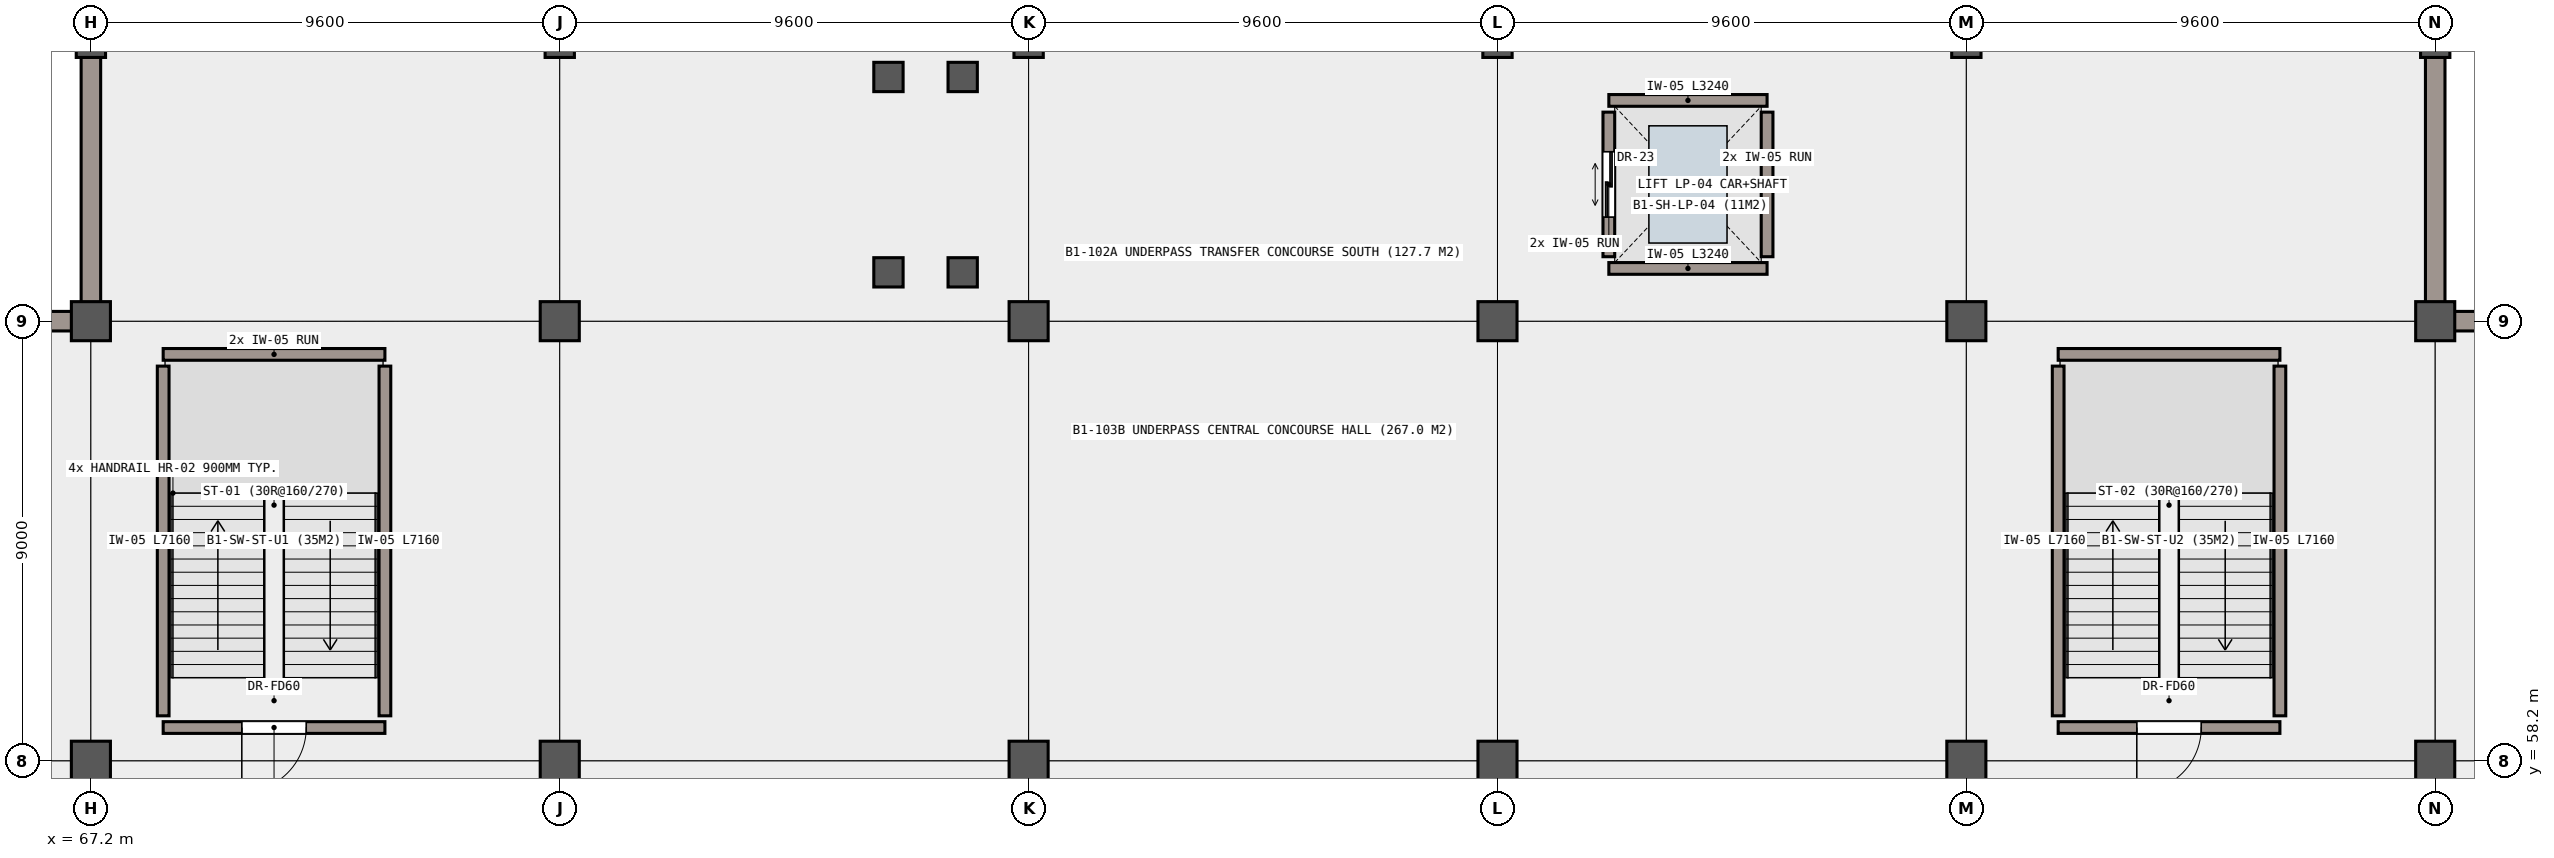
"""IFC4 building model, lengths in metres.
Left out: names, types, materials, properties, quantities, classifications, styles, units other than length and angle.
Written with IfcOpenShell. Run it as: python <this file> out.ifc"""

import sys

from ifc_helpers import new_model, si_unit, direction, frame, frame_2d, origin, origin_2d, place, context, subcontext, project, spatial, rectangle, extrude, element, fill, save


model = new_model("IFC4")
c1 = context("Model", 3, precision=1e-05, world=origin(), true_north=direction((0.0, 1.0)))
c2 = subcontext(c1, "Body", "Model", "MODEL_VIEW")
j1 = project(units=[si_unit("LENGTHUNIT", "METRE"), si_unit("PLANEANGLEUNIT", "RADIAN")], contexts=[c1])
p1 = place(None, origin())
s1 = spatial("IfcSite", under=j1, at=p1, CompositionType="ELEMENT")
p2 = place(p1, origin())
s2 = spatial("IfcBuilding", under=s1, at=p2, CompositionType="ELEMENT")
p3 = place(p2, frame((0.0, 0.0, -4.8)))
s3 = spatial("IfcBuildingStorey", under=s2, at=p3, CompositionType="ELEMENT", Elevation=-4.8)
for number, where, z_axis, x_axis in (
    (1, (67.2, 58.2, 0.0), (0.0, 0.0, 1.0), (1.0, 0.0, 0.0)),
    (2, (67.2, 67.2, 0.0), (0.0, 0.0, 1.0), (1.0, 0.0, 0.0)),
    (3, (76.8, 58.2, 0.0), (0.0, 0.0, 1.0), (1.0, 0.0, 0.0)),
    (4, (76.8, 67.2, 0.0), (0.0, 0.0, 1.0), (1.0, 0.0, 0.0)),
    (5, (86.4, 58.2, 0.0), (0.0, 0.0, 1.0), (1.0, 0.0, 0.0)),
    (6, (86.4, 67.2, 0.0), (0.0, 0.0, 1.0), (1.0, 0.0, 0.0)),
    (7, (96.0, 58.2, 0.0), (0.0, 0.0, 1.0), (1.0, 0.0, 0.0)),
    (8, (96.0, 67.2, 0.0), (0.0, 0.0, 1.0), (1.0, 0.0, 0.0)),
    (9, (105.6, 58.2, 0.0), (0.0, 0.0, 1.0), (1.0, 0.0, 0.0)),
    (10, (105.6, 67.2, 0.0), (0.0, 0.0, 1.0), (1.0, 0.0, 0.0)),
    (11, (115.2, 58.2, 0.0), (0.0, 0.0, 1.0), (1.0, 0.0, 0.0)),
    (12, (115.2, 67.2, 0.0), (0.0, 0.0, 1.0), (1.0, 0.0, 0.0)),
):
    element("IfcColumn", number, at=place(p3, frame(where, z_axis=z_axis, x_axis=x_axis)), inside=s3, PredefinedType="COLUMN", context=c2, shape_type="SweptSolid", body=[
        extrude(rectangle(XDim=0.8, YDim=0.8, at=origin_2d()), origin(), (0.0, 0.0, 1.0), 4.8),
    ])
for number, where, z_axis, x_axis in (
    (13, (67.2, 72.9, 0.0), (0.0, 0.0, 1.0), (1.0, 0.0, 0.0)),
    (14, (76.8, 72.9, 0.0), (0.0, 0.0, 1.0), (1.0, 0.0, 0.0)),
    (15, (86.4, 72.9, 0.0), (0.0, 0.0, 1.0), (1.0, 0.0, 0.0)),
    (16, (96.0, 72.9, 0.0), (0.0, 0.0, 1.0), (1.0, 0.0, 0.0)),
    (17, (105.6, 72.9, 0.0), (0.0, 0.0, 1.0), (1.0, 0.0, 0.0)),
    (18, (115.2, 72.9, 0.0), (0.0, 0.0, 1.0), (1.0, 0.0, 0.0)),
):
    element("IfcColumn", number, at=place(p3, frame(where, z_axis=z_axis, x_axis=x_axis)), inside=s3, PredefinedType="COLUMN", context=c2, shape_type="SweptSolid", body=[
        extrude(rectangle(XDim=0.6, YDim=0.6, at=origin_2d()), origin(), (0.0, 0.0, 1.0), 4.5),
    ])
for number, where, z_axis, x_axis in (
    (19, (83.53, 68.2, 0.0), (0.0, 0.0, 1.0), (1.0, 0.0, 0.0)),
    (20, (83.53, 72.2, 0.0), (0.0, 0.0, 1.0), (1.0, 0.0, 0.0)),
    (21, (85.05, 68.2, 0.0), (0.0, 0.0, 1.0), (1.0, 0.0, 0.0)),
    (22, (85.05, 72.2, 0.0), (0.0, 0.0, 1.0), (1.0, 0.0, 0.0)),
):
    element("IfcColumn", number, at=place(p3, frame(where, z_axis=z_axis, x_axis=x_axis)), inside=s3, PredefinedType="COLUMN", context=c2, shape_type="SweptSolid", body=[
        extrude(rectangle(XDim=0.6, YDim=0.6, at=origin_2d()), origin(), (0.0, 0.0, 1.0), 4.8),
    ])
p4 = place(p3, frame((0.0, 67.2, 0.0), z_axis=(0.0, 0.0, 1.0), x_axis=(1.0, 0.0, 0.0)))
e23 = element("IfcWall", 23, at=p4, inside=s3, PredefinedType="USERDEFINED", context=c2, shape_type="SweptSolid", body=[
    extrude(rectangle(XDim=67.2, YDim=0.4, at=frame_2d((33.6, 0.0))), origin(), (0.0, 0.0, 1.0), 3.88),
])
for number, where, z_axis, x_axis in (
    (24, (67.2, 67.2, 0.0), (0.0, 0.0, 1.0), (0.0, 1.0, 0.0)),
    (25, (115.2, 124.8, 0.0), (0.0, 0.0, 1.0), (0.0, -1.0, 0.0)),
):
    element("IfcWall", number, at=place(p3, frame(where, z_axis=z_axis, x_axis=x_axis)), inside=s3, PredefinedType="USERDEFINED", context=c2, shape_type="SweptSolid", body=[
        extrude(rectangle(XDim=57.6, YDim=0.4, at=frame_2d((28.8, 0.0))), origin(), (0.0, 0.0, 1.0), 3.88),
    ])
p5 = place(p3, frame((115.2, 67.2, 0.0), z_axis=(0.0, 0.0, 1.0), x_axis=(1.0, 0.0, 0.0)))
e26 = element("IfcWall", 26, at=p5, inside=s3, PredefinedType="USERDEFINED", context=c2, shape_type="SweptSolid", body=[
    extrude(rectangle(XDim=9.6, YDim=0.4, at=frame_2d((4.8, 0.0))), origin(), (0.0, 0.0, 1.0), 3.88),
])
for number, where, z_axis, x_axis in (
    (27, (101.52, 68.28, 0.0), (0.0, 0.0, 1.0), (-1.0, 0.0, 0.0)),
    (28, (98.28, 71.72, 0.0), (0.0, 0.0, 1.0), (1.0, 0.0, 0.0)),
):
    element("IfcWall", number, at=place(p3, frame(where, z_axis=z_axis, x_axis=x_axis)), inside=s3, PredefinedType="SHEAR", context=c2, shape_type="SweptSolid", body=[
        extrude(rectangle(XDim=3.24, YDim=0.24, at=frame_2d((1.62, 0.0))), origin(), (0.0, 0.0, 1.0), 4.48),
    ])
p6 = place(p3, frame((98.28, 68.52, 0.0), z_axis=(0.0, 0.0, 1.0), x_axis=(0.0, 1.0, 0.0)))
e29 = element("IfcWall", 29, at=p6, inside=s3, PredefinedType="SHEAR", context=c2, shape_type="SweptSolid", body=[
    extrude(rectangle(XDim=2.96, YDim=0.24, at=frame_2d((1.48, 0.0))), origin(), (0.0, 0.0, 1.0), 4.48),
])
p7 = place(p6, frame((0.81, 0.0, 0.0)))
e30 = element("IfcOpeningElement", 30, at=p7, cuts=e29, PredefinedType="OPENING", context=c2, shape_type="SweptSolid", body=[
    extrude(rectangle(XDim=1.34, YDim=2.18, at=frame_2d((0.67, 1.09))), frame((0.0, 0.13, 0.0), z_axis=(0.0, -1.0, 0.0), x_axis=(1.0, 0.0, 0.0)), (0.0, 0.0, 1.0), 0.26),
])
p8 = place(p3, frame((101.52, 71.48, 0.0), z_axis=(0.0, 0.0, 1.0), x_axis=(0.0, -1.0, 0.0)))
e31 = element("IfcWall", 31, at=p8, inside=s3, PredefinedType="SHEAR", context=c2, shape_type="SweptSolid", body=[
    extrude(rectangle(XDim=2.96, YDim=0.24, at=frame_2d((1.48, 0.0))), origin(), (0.0, 0.0, 1.0), 4.48),
])
p9 = place(p3, frame((73.22, 58.88, 0.0), z_axis=(0.0, 0.0, 1.0), x_axis=(-1.0, 0.0, 0.0)))
e32 = element("IfcWall", 32, at=p9, inside=s3, PredefinedType="SHEAR", context=c2, shape_type="SweptSolid", body=[
    extrude(rectangle(XDim=4.54, YDim=0.24, at=frame_2d((2.27, 0.0))), origin(), (0.0, 0.0, 1.0), 4.48),
])
p10 = place(p9, frame((1.61, 0.0, 0.0)))
e33 = element("IfcOpeningElement", 33, at=p10, cuts=e32, PredefinedType="OPENING", context=c2, shape_type="SweptSolid", body=[
    extrude(rectangle(XDim=1.32, YDim=2.15, at=frame_2d((0.66, 1.075))), frame((0.0, 0.13, 0.0), z_axis=(0.0, -1.0, 0.0), x_axis=(1.0, 0.0, 0.0)), (0.0, 0.0, 1.0), 0.26),
])
p11 = place(p3, frame((68.68, 66.52, 0.0), z_axis=(0.0, 0.0, 1.0), x_axis=(1.0, 0.0, 0.0)))
e34 = element("IfcWall", 34, at=p11, inside=s3, PredefinedType="SHEAR", context=c2, shape_type="SweptSolid", body=[
    extrude(rectangle(XDim=4.54, YDim=0.24, at=frame_2d((2.27, 0.0))), origin(), (0.0, 0.0, 1.0), 4.48),
])
for number, where, z_axis, x_axis in (
    (35, (68.68, 59.12, 0.0), (0.0, 0.0, 1.0), (0.0, 1.0, 0.0)),
    (36, (73.22, 66.28, 0.0), (0.0, 0.0, 1.0), (0.0, -1.0, 0.0)),
):
    element("IfcWall", number, at=place(p3, frame(where, z_axis=z_axis, x_axis=x_axis)), inside=s3, PredefinedType="SHEAR", context=c2, shape_type="SweptSolid", body=[
        extrude(rectangle(XDim=7.16, YDim=0.24, at=frame_2d((3.58, 0.0))), origin(), (0.0, 0.0, 1.0), 4.48),
    ])
p12 = place(p3, frame((112.02, 58.88, 0.0), z_axis=(0.0, 0.0, 1.0), x_axis=(-1.0, 0.0, 0.0)))
e37 = element("IfcWall", 37, at=p12, inside=s3, PredefinedType="SHEAR", context=c2, shape_type="SweptSolid", body=[
    extrude(rectangle(XDim=4.54, YDim=0.24, at=frame_2d((2.27, 0.0))), origin(), (0.0, 0.0, 1.0), 4.48),
])
p13 = place(p12, frame((1.61, 0.0, 0.0)))
e38 = element("IfcOpeningElement", 38, at=p13, cuts=e37, PredefinedType="OPENING", context=c2, shape_type="SweptSolid", body=[
    extrude(rectangle(XDim=1.32, YDim=2.15, at=frame_2d((0.66, 1.075))), frame((0.0, 0.13, 0.0), z_axis=(0.0, -1.0, 0.0), x_axis=(1.0, 0.0, 0.0)), (0.0, 0.0, 1.0), 0.26),
])
p14 = place(p3, frame((107.48, 66.52, 0.0), z_axis=(0.0, 0.0, 1.0), x_axis=(1.0, 0.0, 0.0)))
e39 = element("IfcWall", 39, at=p14, inside=s3, PredefinedType="SHEAR", context=c2, shape_type="SweptSolid", body=[
    extrude(rectangle(XDim=4.54, YDim=0.24, at=frame_2d((2.27, 0.0))), origin(), (0.0, 0.0, 1.0), 4.48),
])
for number, where, z_axis, x_axis in (
    (40, (107.48, 59.12, 0.0), (0.0, 0.0, 1.0), (0.0, 1.0, 0.0)),
    (41, (112.02, 66.28, 0.0), (0.0, 0.0, 1.0), (0.0, -1.0, 0.0)),
):
    element("IfcWall", number, at=place(p3, frame(where, z_axis=z_axis, x_axis=x_axis)), inside=s3, PredefinedType="SHEAR", context=c2, shape_type="SweptSolid", body=[
        extrude(rectangle(XDim=7.16, YDim=0.24, at=frame_2d((3.58, 0.0))), origin(), (0.0, 0.0, 1.0), 4.48),
    ])
p15 = place(p7, origin())
e42 = element("IfcDoor", 42, at=p15, inside=s3, OperationType="DOUBLE_DOOR_SLIDING", PredefinedType="DOOR", context=c2, shape_type="SweptSolid", body=[
    extrude(rectangle(XDim=1.34, YDim=2.18, at=frame_2d((0.67, 1.09))), frame((0.0, 0.025, 0.0), z_axis=(0.0, -1.0, 0.0), x_axis=(1.0, 0.0, 0.0)), (0.0, 0.0, 1.0), 0.05),
])
fill(e30, e42)
p16 = place(p10, origin())
e43 = element("IfcDoor", 43, at=p16, inside=s3, OperationType="SINGLE_SWING_RIGHT", PredefinedType="DOOR", context=c2, shape_type="SweptSolid", body=[
    extrude(rectangle(XDim=1.32, YDim=2.15, at=frame_2d((0.66, 1.075))), frame((0.0, 0.025, 0.0), z_axis=(0.0, -1.0, 0.0), x_axis=(1.0, 0.0, 0.0)), (0.0, 0.0, 1.0), 0.05),
])
fill(e33, e43)
p17 = place(p13, origin())
e44 = element("IfcDoor", 44, at=p17, inside=s3, OperationType="SINGLE_SWING_RIGHT", PredefinedType="DOOR", context=c2, shape_type="SweptSolid", body=[
    extrude(rectangle(XDim=1.32, YDim=2.15, at=frame_2d((0.66, 1.075))), frame((0.0, 0.025, 0.0), z_axis=(0.0, -1.0, 0.0), x_axis=(1.0, 0.0, 0.0)), (0.0, 0.0, 1.0), 0.05),
])
fill(e38, e44)
save(model, sys.argv[1])
